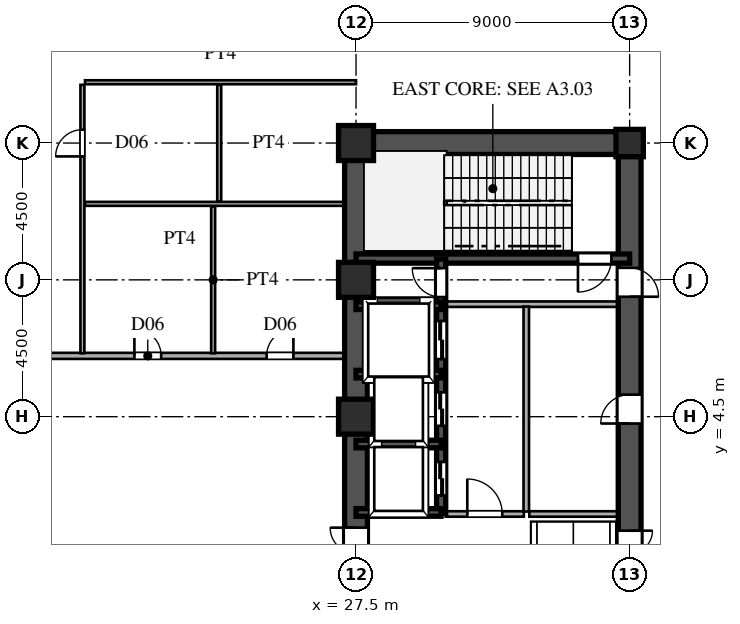
"""IFC4 building model, lengths in metres.
Left out: names, types, materials, properties, quantities, classifications, styles, units other than length and angle.
Written with IfcOpenShell. Run it as: python <this file> out.ifc"""

import sys

from ifc_helpers import new_model, si_unit, direction, frame, frame_2d, origin, origin_2d, place, context, subcontext, project, spatial, rectangle, hollow_rectangle, i_section, extrude, source, transform, mapped, element, fill, save


model = new_model("IFC4")
c1 = context("Model", 3, precision=1e-05, world=origin(), true_north=direction((0.0, 1.0)))
c2 = subcontext(c1, "Body", "Model", "MODEL_VIEW")
j1 = project(units=[si_unit("LENGTHUNIT", "METRE"), si_unit("PLANEANGLEUNIT", "RADIAN")], contexts=[c1])
p1 = place(None, origin())
s1 = spatial("IfcSite", under=j1, at=p1, CompositionType="ELEMENT")
p2 = place(p1, origin())
s2 = spatial("IfcBuilding", under=s1, at=p2, CompositionType="ELEMENT")
p3 = place(p2, origin())
s3 = spatial("IfcBuildingStorey", under=s2, at=p3, CompositionType="ELEMENT", Elevation=0.0)
m1 = source(origin(), c2, "Body", "SweptSolid", [
    extrude(hollow_rectangle(XDim=1.15, YDim=1.15, WallThickness=0.048, at=origin_2d()), origin(), (0.0, 0.0, 1.0), 5.4),
])
for number, where, z_axis, x_axis in (
    (1, (27.5, 4.5, 0.0), (0.0, 0.0, 1.0), (1.0, 0.0, 0.0)),
    (2, (27.5, 9.0, 0.0), (0.0, 0.0, 1.0), (1.0, 0.0, 0.0)),
    (3, (27.5, 13.5, 0.0), (0.0, 0.0, 1.0), (1.0, 0.0, 0.0)),
):
    element("IfcColumn", number, at=place(p3, frame(where, z_axis=z_axis, x_axis=x_axis)), inside=s3, PredefinedType="COLUMN", context=c2, shape_type="MappedRepresentation", body=[
        mapped(m1, transform((0.0, 0.0, 0.0), scale=1.0)),
    ])
m2 = source(origin(), c2, "Body", "SweptSolid", [
    extrude(i_section(OverallWidth=0.9, OverallDepth=0.9, WebThickness=0.036, FlangeThickness=0.055, at=origin_2d()), origin(), (0.0, 0.0, 1.0), 5.4),
])
p4 = place(p3, frame((36.5, 13.5, 0.0), z_axis=(0.0, 0.0, 1.0), x_axis=(1.0, 0.0, 0.0)))
e4 = element("IfcColumn", 4, at=p4, inside=s3, PredefinedType="COLUMN", context=c2, shape_type="MappedRepresentation", body=[
    mapped(m2, transform((0.0, 0.0, 0.0), scale=1.0)),
])
p5 = place(p3, frame((27.5, 1.3, 0.0), z_axis=(0.0, 0.0, 1.0), x_axis=(0.0, 1.0, 0.0)))
e5 = element("IfcWall", 5, at=p5, inside=s3, PredefinedType="SHEAR", context=c2, shape_type="SweptSolid", body=[
    extrude(rectangle(XDim=12.2, YDim=0.75, at=frame_2d((6.1, 0.0))), origin(), (0.0, 0.0, 1.0), 5.12),
])
p6 = place(p3, frame((27.5, -1.3, 0.0), z_axis=(0.0, 0.0, 1.0), x_axis=(0.0, 1.0, 0.0)))
e6 = element("IfcWall", 6, at=p6, inside=s3, PredefinedType="SHEAR", context=c2, shape_type="SweptSolid", body=[
    extrude(rectangle(XDim=2.6, YDim=0.75, at=frame_2d((1.3, 0.0))), origin(), (0.0, 0.0, 1.0), 5.12),
])
p7 = place(p6, frame((0.45, 0.0, 0.0)))
e7 = element("IfcOpeningElement", 7, at=p7, cuts=e6, PredefinedType="OPENING", context=c2, shape_type="SweptSolid", body=[
    extrude(rectangle(XDim=1.7, YDim=2.35, at=frame_2d((0.85, 1.175))), frame((0.0, 0.385, 0.0), z_axis=(0.0, -1.0, 0.0), x_axis=(1.0, 0.0, 0.0)), (0.0, 0.0, 1.0), 0.77),
])
p8 = place(p3, frame((27.5, 13.5, 0.0), z_axis=(0.0, 0.0, 1.0), x_axis=(1.0, 0.0, 0.0)))
e8 = element("IfcWall", 8, at=p8, inside=s3, PredefinedType="SHEAR", context=c2, shape_type="SweptSolid", body=[
    extrude(rectangle(XDim=9.0, YDim=0.75, at=frame_2d((4.5, 0.0))), origin(), (0.0, 0.0, 1.0), 5.12),
])
p9 = place(p3, frame((36.5, -1.3, 0.0), z_axis=(0.0, 0.0, 1.0), x_axis=(0.0, 1.0, 0.0)))
e9 = element("IfcWall", 9, at=p9, inside=s3, PredefinedType="SHEAR", context=c2, shape_type="SweptSolid", body=[
    extrude(rectangle(XDim=2.6, YDim=0.75, at=frame_2d((1.3, 0.0))), origin(), (0.0, 0.0, 1.0), 5.12),
])
p10 = place(p9, frame((0.55, 0.0, 0.0)))
e10 = element("IfcOpeningElement", 10, at=p10, cuts=e9, PredefinedType="OPENING", context=c2, shape_type="SweptSolid", body=[
    extrude(rectangle(XDim=1.5, YDim=2.3, at=frame_2d((0.75, 1.15))), frame((0.0, 0.385, 0.0), z_axis=(0.0, -1.0, 0.0), x_axis=(1.0, 0.0, 0.0)), (0.0, 0.0, 1.0), 0.77),
])
p11 = place(p3, frame((36.5, 8.2, 0.0), z_axis=(0.0, 0.0, 1.0), x_axis=(0.0, 1.0, 0.0)))
e11 = element("IfcWall", 11, at=p11, inside=s3, PredefinedType="SHEAR", context=c2, shape_type="SweptSolid", body=[
    extrude(rectangle(XDim=5.45, YDim=0.75, at=frame_2d((2.725, 0.0))), origin(), (0.0, 0.0, 1.0), 5.12),
])
p12 = place(p11, frame((0.245, 0.0, 0.0)))
e12 = element("IfcOpeningElement", 12, at=p12, cuts=e11, PredefinedType="OPENING", context=c2, shape_type="SweptSolid", body=[
    extrude(rectangle(XDim=0.95, YDim=2.15, at=frame_2d((0.475, 1.075))), frame((0.0, 0.385, 0.0), z_axis=(0.0, -1.0, 0.0), x_axis=(1.0, 0.0, 0.0)), (0.0, 0.0, 1.0), 0.77),
])
p13 = place(p3, frame((36.5, 1.3, 0.0), z_axis=(0.0, 0.0, 1.0), x_axis=(0.0, 1.0, 0.0)))
e13 = element("IfcWall", 13, at=p13, inside=s3, PredefinedType="SHEAR", context=c2, shape_type="SweptSolid", body=[
    extrude(rectangle(XDim=6.9, YDim=0.75, at=frame_2d((3.45, 0.0))), origin(), (0.0, 0.0, 1.0), 5.12),
])
p14 = place(p13, frame((2.975, 0.0, 0.0)))
e14 = element("IfcOpeningElement", 14, at=p14, cuts=e13, PredefinedType="OPENING", context=c2, shape_type="SweptSolid", body=[
    extrude(rectangle(XDim=0.95, YDim=2.15, at=frame_2d((0.475, 1.075))), frame((0.0, 0.385, 0.0), z_axis=(0.0, -1.0, 0.0), x_axis=(1.0, 0.0, 0.0)), (0.0, 0.0, 1.0), 0.77),
])
p15 = place(p3, frame((27.5, 9.7, 0.0), z_axis=(0.0, 0.0, 1.0), x_axis=(1.0, 0.0, 0.0)))
e15 = element("IfcWall", 15, at=p15, inside=s3, PredefinedType="SHEAR", context=c2, shape_type="SweptSolid", body=[
    extrude(rectangle(XDim=9.0, YDim=0.3, at=frame_2d((4.5, 0.0))), origin(), (0.0, 0.0, 1.0), 5.12),
])
p16 = place(p15, frame((7.3, 0.0, 0.0)))
e16 = element("IfcOpeningElement", 16, at=p16, cuts=e15, PredefinedType="OPENING", context=c2, shape_type="SweptSolid", body=[
    extrude(rectangle(XDim=1.1, YDim=2.2, at=frame_2d((0.55, 1.1))), frame((0.0, 0.16, 0.0), z_axis=(0.0, -1.0, 0.0), x_axis=(1.0, 0.0, 0.0)), (0.0, 0.0, 1.0), 0.32),
])
for number, where, z_axis, x_axis in (
    (17, (27.5, 1.35, 0.0), (0.0, 0.0, 1.0), (1.0, 0.0, 0.0)),
    (18, (27.5, 3.6, 0.0), (0.0, 0.0, 1.0), (1.0, 0.0, 0.0)),
    (19, (27.5, 5.9, 0.0), (0.0, 0.0, 1.0), (1.0, 0.0, 0.0)),
    (20, (27.5, 8.15, 0.0), (0.0, 0.0, 1.0), (1.0, 0.0, 0.0)),
):
    element("IfcWall", number, at=place(p3, frame(where, z_axis=z_axis, x_axis=x_axis)), inside=s3, PredefinedType="SHEAR", context=c2, shape_type="SweptSolid", body=[
        extrude(rectangle(XDim=2.8, YDim=0.25, at=frame_2d((1.4, 0.0))), origin(), (0.0, 0.0, 1.0), 5.12),
    ])
p17 = place(p3, frame((30.3, 1.32, 0.0), z_axis=(0.0, 0.0, 1.0), x_axis=(0.0, 1.0, 0.0)))
e21 = element("IfcWall", 21, at=p17, inside=s3, PredefinedType="SHEAR", context=c2, shape_type="SweptSolid", body=[
    extrude(rectangle(XDim=2.28, YDim=0.3, at=frame_2d((1.14, 0.0))), origin(), (0.0, 0.0, 1.0), 5.12),
])
p18 = place(p17, frame((0.59, 0.0, 0.0)))
e22 = element("IfcOpeningElement", 22, at=p18, cuts=e21, PredefinedType="OPENING", context=c2, shape_type="SweptSolid", body=[
    extrude(rectangle(XDim=1.1, YDim=2.2, at=frame_2d((0.55, 1.1))), frame((0.0, 0.16, 0.0), z_axis=(0.0, -1.0, 0.0), x_axis=(1.0, 0.0, 0.0)), (0.0, 0.0, 1.0), 0.32),
])
p19 = place(p3, frame((30.3, 3.6, 0.0), z_axis=(0.0, 0.0, 1.0), x_axis=(0.0, 1.0, 0.0)))
e23 = element("IfcWall", 23, at=p19, inside=s3, PredefinedType="SHEAR", context=c2, shape_type="SweptSolid", body=[
    extrude(rectangle(XDim=2.3, YDim=0.3, at=frame_2d((1.15, 0.0))), origin(), (0.0, 0.0, 1.0), 5.12),
])
p20 = place(p19, frame((0.6, 0.0, 0.0)))
e24 = element("IfcOpeningElement", 24, at=p20, cuts=e23, PredefinedType="OPENING", context=c2, shape_type="SweptSolid", body=[
    extrude(rectangle(XDim=1.1, YDim=2.2, at=frame_2d((0.55, 1.1))), frame((0.0, 0.16, 0.0), z_axis=(0.0, -1.0, 0.0), x_axis=(1.0, 0.0, 0.0)), (0.0, 0.0, 1.0), 0.32),
])
p21 = place(p3, frame((30.3, 5.9, 0.0), z_axis=(0.0, 0.0, 1.0), x_axis=(0.0, 1.0, 0.0)))
e25 = element("IfcWall", 25, at=p21, inside=s3, PredefinedType="SHEAR", context=c2, shape_type="SweptSolid", body=[
    extrude(rectangle(XDim=2.25, YDim=0.3, at=frame_2d((1.125, 0.0))), origin(), (0.0, 0.0, 1.0), 5.12),
])
p22 = place(p21, frame((0.495, 0.0, 0.0)))
e26 = element("IfcOpeningElement", 26, at=p22, cuts=e25, PredefinedType="OPENING", context=c2, shape_type="SweptSolid", body=[
    extrude(rectangle(XDim=1.25, YDim=2.3, at=frame_2d((0.625, 1.15))), frame((0.0, 0.16, 0.0), z_axis=(0.0, -1.0, 0.0), x_axis=(1.0, 0.0, 0.0)), (0.0, 0.0, 1.0), 0.32),
])
p23 = place(p3, frame((30.3, 8.15, 0.0), z_axis=(0.0, 0.0, 1.0), x_axis=(0.0, 1.0, 0.0)))
e27 = element("IfcWall", 27, at=p23, inside=s3, PredefinedType="SHEAR", context=c2, shape_type="SweptSolid", body=[
    extrude(rectangle(XDim=1.53, YDim=0.3, at=frame_2d((0.765, 0.0))), origin(), (0.0, 0.0, 1.0), 5.12),
])
p24 = place(p23, frame((0.285, 0.0, 0.0)))
e28 = element("IfcOpeningElement", 28, at=p24, cuts=e27, PredefinedType="OPENING", context=c2, shape_type="SweptSolid", body=[
    extrude(rectangle(XDim=0.95, YDim=2.15, at=frame_2d((0.475, 1.075))), frame((0.0, 0.16, 0.0), z_axis=(0.0, -1.0, 0.0), x_axis=(1.0, 0.0, 0.0)), (0.0, 0.0, 1.0), 0.32),
])
p25 = place(p3, frame((30.45, 8.2, 0.0), z_axis=(0.0, 0.0, 1.0), x_axis=(1.0, 0.0, 0.0)))
e29 = element("IfcWall", 29, at=p25, inside=s3, PredefinedType="PARTITIONING", context=c2, shape_type="SweptSolid", body=[
    extrude(rectangle(XDim=5.7, YDim=0.18, at=frame_2d((2.85, 0.0))), origin(), (0.0, 0.0, 1.0), 5.12),
])
p26 = place(p3, frame((33.1, 1.38, 0.0), z_axis=(0.0, 0.0, 1.0), x_axis=(0.0, 1.0, 0.0)))
e30 = element("IfcWall", 30, at=p26, inside=s3, PredefinedType="PARTITIONING", context=c2, shape_type="SweptSolid", body=[
    extrude(rectangle(XDim=6.74, YDim=0.18, at=frame_2d((3.37, 0.0))), origin(), (0.0, 0.0, 1.0), 5.12),
])
p27 = place(p3, frame((30.45, 1.3, 0.0), z_axis=(0.0, 0.0, 1.0), x_axis=(1.0, 0.0, 0.0)))
e31 = element("IfcWall", 31, at=p27, inside=s3, PredefinedType="PARTITIONING", context=c2, shape_type="SweptSolid", body=[
    extrude(rectangle(XDim=2.57, YDim=0.18, at=frame_2d((1.285, 0.0))), origin(), (0.0, 0.0, 1.0), 5.12),
])
p28 = place(p27, frame((0.71, 0.0, 0.0)))
e32 = element("IfcOpeningElement", 32, at=p28, cuts=e31, PredefinedType="OPENING", context=c2, shape_type="SweptSolid", body=[
    extrude(rectangle(XDim=1.15, YDim=2.2, at=frame_2d((0.575, 1.1))), frame((0.0, 0.1, 0.0), z_axis=(0.0, -1.0, 0.0), x_axis=(1.0, 0.0, 0.0)), (0.0, 0.0, 1.0), 0.2),
])
p29 = place(p3, frame((33.2, 1.3, 0.0), z_axis=(0.0, 0.0, 1.0), x_axis=(1.0, 0.0, 0.0)))
e33 = element("IfcWall", 33, at=p29, inside=s3, PredefinedType="PARTITIONING", context=c2, shape_type="SweptSolid", body=[
    extrude(rectangle(XDim=2.95, YDim=0.18, at=frame_2d((1.475, 0.0))), origin(), (0.0, 0.0, 1.0), 5.12),
])
p30 = place(p3, frame((-27.12, 6.5, 0.0), z_axis=(0.0, 0.0, 1.0), x_axis=(1.0, 0.0, 0.0)))
e34 = element("IfcWall", 34, at=p30, inside=s3, PredefinedType="PARTITIONING", context=c2, shape_type="SweptSolid", body=[
    extrude(rectangle(XDim=54.24, YDim=0.2, at=frame_2d((27.12, 0.0))), origin(), (0.0, 0.0, 1.0), 5.12),
])
p31 = place(p30, frame((4.045, 0.0, 0.0)))
e35 = element("IfcOpeningElement", 35, at=p31, cuts=e34, PredefinedType="OPENING", context=c2, shape_type="SweptSolid", body=[
    extrude(rectangle(XDim=1.15, YDim=2.2, at=frame_2d((0.575, 1.1))), frame((0.0, 0.11, 0.0), z_axis=(0.0, -1.0, 0.0), x_axis=(1.0, 0.0, 0.0)), (0.0, 0.0, 1.0), 0.22),
])
p32 = place(p30, frame((17.395, 0.0, 0.0)))
e36 = element("IfcOpeningElement", 36, at=p32, cuts=e34, PredefinedType="OPENING", context=c2, shape_type="SweptSolid", body=[
    extrude(rectangle(XDim=0.95, YDim=2.15, at=frame_2d((0.475, 1.075))), frame((0.0, 0.11, 0.0), z_axis=(0.0, -1.0, 0.0), x_axis=(1.0, 0.0, 0.0)), (0.0, 0.0, 1.0), 0.22),
])
p33 = place(p30, frame((47.33, 0.0, 0.0)))
e37 = element("IfcOpeningElement", 37, at=p33, cuts=e34, PredefinedType="OPENING", context=c2, shape_type="SweptSolid", body=[
    extrude(rectangle(XDim=0.88, YDim=2.1, at=frame_2d((0.44, 1.05))), frame((0.0, 0.11, 0.0), z_axis=(0.0, -1.0, 0.0), x_axis=(1.0, 0.0, 0.0)), (0.0, 0.0, 1.0), 0.22),
])
p34 = place(p30, frame((51.68, 0.0, 0.0)))
e38 = element("IfcOpeningElement", 38, at=p34, cuts=e34, PredefinedType="OPENING", context=c2, shape_type="SweptSolid", body=[
    extrude(rectangle(XDim=0.88, YDim=2.1, at=frame_2d((0.44, 1.05))), frame((0.0, 0.11, 0.0), z_axis=(0.0, -1.0, 0.0), x_axis=(1.0, 0.0, 0.0)), (0.0, 0.0, 1.0), 0.22),
])
p35 = place(p3, frame((18.585, 11.5, 0.0), z_axis=(0.0, 0.0, 1.0), x_axis=(1.0, 0.0, 0.0)))
e39 = element("IfcWall", 39, at=p35, inside=s3, PredefinedType="PARTITIONING", context=c2, shape_type="SweptSolid", body=[
    extrude(rectangle(XDim=8.535, YDim=0.13, at=frame_2d((4.268, 0.0))), origin(), (0.0, 0.0, 1.0), 5.12),
])
p36 = place(p3, frame((18.585, 15.5, 0.0), z_axis=(0.0, 0.0, 1.0), x_axis=(1.0, 0.0, 0.0)))
e40 = element("IfcWall", 40, at=p36, inside=s3, PredefinedType="PARTITIONING", context=c2, shape_type="SweptSolid", body=[
    extrude(rectangle(XDim=8.915, YDim=0.13, at=frame_2d((4.458, 0.0))), origin(), (0.0, 0.0, 1.0), 5.12),
])
p37 = place(p3, frame((18.5, 6.585, 0.0), z_axis=(0.0, 0.0, 1.0), x_axis=(0.0, 1.0, 0.0)))
e41 = element("IfcWall", 41, at=p37, inside=s3, PredefinedType="PARTITIONING", context=c2, shape_type="SweptSolid", body=[
    extrude(rectangle(XDim=8.83, YDim=0.13, at=frame_2d((4.415, 0.0))), origin(), (0.0, 0.0, 1.0), 5.12),
])
p38 = place(p37, frame((6.475, 0.0, 0.0)))
e42 = element("IfcOpeningElement", 42, at=p38, cuts=e41, PredefinedType="OPENING", context=c2, shape_type="SweptSolid", body=[
    extrude(rectangle(XDim=0.88, YDim=2.1, at=frame_2d((0.44, 1.05))), frame((0.0, 0.075, 0.0), z_axis=(0.0, -1.0, 0.0), x_axis=(1.0, 0.0, 0.0)), (0.0, 0.0, 1.0), 0.15),
])
p39 = place(p3, frame((22.8, 6.585, 0.0), z_axis=(0.0, 0.0, 1.0), x_axis=(0.0, 1.0, 0.0)))
e43 = element("IfcWall", 43, at=p39, inside=s3, PredefinedType="PARTITIONING", context=c2, shape_type="SweptSolid", body=[
    extrude(rectangle(XDim=4.83, YDim=0.13, at=frame_2d((2.415, 0.0))), origin(), (0.0, 0.0, 1.0), 5.12),
])
p40 = place(p3, frame((23.0, 11.585, 0.0), z_axis=(0.0, 0.0, 1.0), x_axis=(0.0, 1.0, 0.0)))
e44 = element("IfcWall", 44, at=p40, inside=s3, PredefinedType="PARTITIONING", context=c2, shape_type="SweptSolid", body=[
    extrude(rectangle(XDim=3.83, YDim=0.13, at=frame_2d((1.915, 0.0))), origin(), (0.0, 0.0, 1.0), 5.12),
])
m3 = source(origin(), c2, "Body", "SweptSolid", [
    extrude(rectangle(XDim=1.7, YDim=2.35, at=frame_2d((0.85, 1.175))), frame((0.0, 0.025, 0.0), z_axis=(0.0, -1.0, 0.0), x_axis=(1.0, 0.0, 0.0)), (0.0, 0.0, 1.0), 0.05),
])
p41 = place(p7, origin())
e45 = element("IfcDoor", 45, at=p41, inside=s3, OperationType="DOUBLE_SWING_LEFT", PredefinedType="DOOR", context=c2, shape_type="MappedRepresentation", body=[
    mapped(m3, transform((0.0, 0.0, 0.0), scale=1.0)),
])
fill(e7, e45)
m4 = source(origin(), c2, "Body", "SweptSolid", [
    extrude(rectangle(XDim=1.5, YDim=2.3, at=frame_2d((0.75, 1.15))), frame((0.0, 0.025, 0.0), z_axis=(0.0, -1.0, 0.0), x_axis=(1.0, 0.0, 0.0)), (0.0, 0.0, 1.0), 0.05),
])
p42 = place(p10, frame((1.5, 0.0, 0.0), z_axis=(0.0, 0.0, 1.0), x_axis=(-1.0, 0.0, 0.0)))
e46 = element("IfcDoor", 46, at=p42, inside=s3, OperationType="DOUBLE_SWING_LEFT", PredefinedType="DOOR", context=c2, shape_type="MappedRepresentation", body=[
    mapped(m4, transform((0.0, 0.0, 0.0), scale=1.0)),
])
fill(e10, e46)
m5 = source(origin(), c2, "Body", "SweptSolid", [
    extrude(rectangle(XDim=0.95, YDim=2.15, at=frame_2d((0.475, 1.075))), frame((0.0, 0.025, 0.0), z_axis=(0.0, -1.0, 0.0), x_axis=(1.0, 0.0, 0.0)), (0.0, 0.0, 1.0), 0.05),
])
p43 = place(p12, frame((0.95, 0.0, 0.0), z_axis=(0.0, 0.0, 1.0), x_axis=(-1.0, 0.0, 0.0)))
e47 = element("IfcDoor", 47, at=p43, inside=s3, OperationType="SINGLE_SWING_LEFT", PredefinedType="DOOR", context=c2, shape_type="MappedRepresentation", body=[
    mapped(m5, transform((0.0, 0.0, 0.0), scale=1.0)),
])
fill(e12, e47)
p44 = place(p14, origin())
e48 = element("IfcDoor", 48, at=p44, inside=s3, OperationType="SINGLE_SWING_LEFT", PredefinedType="DOOR", context=c2, shape_type="MappedRepresentation", body=[
    mapped(m5, transform((0.0, 0.0, 0.0), scale=1.0)),
])
fill(e14, e48)
m6 = source(origin(), c2, "Body", "SweptSolid", [
    extrude(rectangle(XDim=1.1, YDim=2.2, at=frame_2d((0.55, 1.1))), frame((0.0, 0.025, 0.0), z_axis=(0.0, -1.0, 0.0), x_axis=(1.0, 0.0, 0.0)), (0.0, 0.0, 1.0), 0.05),
])
p45 = place(p16, frame((1.1, 0.0, 0.0), z_axis=(0.0, 0.0, 1.0), x_axis=(-1.0, 0.0, 0.0)))
e49 = element("IfcDoor", 49, at=p45, inside=s3, OperationType="SINGLE_SWING_LEFT", PredefinedType="DOOR", context=c2, shape_type="MappedRepresentation", body=[
    mapped(m6, transform((0.0, 0.0, 0.0), scale=1.0)),
])
fill(e16, e49)
m7 = source(origin(), c2, "Body", "SweptSolid", [
    extrude(rectangle(XDim=1.1, YDim=2.2, at=frame_2d((0.55, 1.1))), frame((0.0, 0.025, 0.0), z_axis=(0.0, -1.0, 0.0), x_axis=(1.0, 0.0, 0.0)), (0.0, 0.0, 1.0), 0.05),
])
p46 = place(p18, origin())
e50 = element("IfcDoor", 50, at=p46, inside=s3, OperationType="DOUBLE_DOOR_SLIDING", PredefinedType="DOOR", context=c2, shape_type="MappedRepresentation", body=[
    mapped(m7, transform((0.0, 0.0, 0.0), scale=1.0)),
])
fill(e22, e50)
p47 = place(p20, origin())
e51 = element("IfcDoor", 51, at=p47, inside=s3, OperationType="DOUBLE_DOOR_SLIDING", PredefinedType="DOOR", context=c2, shape_type="MappedRepresentation", body=[
    mapped(m7, transform((0.0, 0.0, 0.0), scale=1.0)),
])
fill(e24, e51)
m8 = source(origin(), c2, "Body", "SweptSolid", [
    extrude(rectangle(XDim=1.25, YDim=2.3, at=frame_2d((0.625, 1.15))), frame((0.0, 0.025, 0.0), z_axis=(0.0, -1.0, 0.0), x_axis=(1.0, 0.0, 0.0)), (0.0, 0.0, 1.0), 0.05),
])
p48 = place(p22, origin())
e52 = element("IfcDoor", 52, at=p48, inside=s3, OperationType="DOUBLE_DOOR_SLIDING", PredefinedType="DOOR", context=c2, shape_type="MappedRepresentation", body=[
    mapped(m8, transform((0.0, 0.0, 0.0), scale=1.0)),
])
fill(e26, e52)
p49 = place(p24, origin())
e53 = element("IfcDoor", 53, at=p49, inside=s3, OperationType="SINGLE_SWING_RIGHT", PredefinedType="DOOR", context=c2, shape_type="MappedRepresentation", body=[
    mapped(m5, transform((0.0, 0.0, 0.0), scale=1.0)),
])
fill(e28, e53)
m9 = source(origin(), c2, "Body", "SweptSolid", [
    extrude(rectangle(XDim=1.15, YDim=2.2, at=frame_2d((0.575, 1.1))), frame((0.0, 0.025, 0.0), z_axis=(0.0, -1.0, 0.0), x_axis=(1.0, 0.0, 0.0)), (0.0, 0.0, 1.0), 0.05),
])
p50 = place(p28, origin())
e54 = element("IfcDoor", 54, at=p50, inside=s3, OperationType="SINGLE_SWING_LEFT", PredefinedType="DOOR", context=c2, shape_type="MappedRepresentation", body=[
    mapped(m9, transform((0.0, 0.0, 0.0), scale=1.0)),
])
fill(e32, e54)
m10 = source(origin(), c2, "Body", "SweptSolid", [
    extrude(rectangle(XDim=0.88, YDim=2.1, at=frame_2d((0.44, 1.05))), frame((0.0, 0.025, 0.0), z_axis=(0.0, -1.0, 0.0), x_axis=(1.0, 0.0, 0.0)), (0.0, 0.0, 1.0), 0.05),
])
p51 = place(p33, origin())
e55 = element("IfcDoor", 55, at=p51, inside=s3, OperationType="SINGLE_SWING_LEFT", PredefinedType="DOOR", context=c2, shape_type="MappedRepresentation", body=[
    mapped(m10, transform((0.0, 0.0, 0.0), scale=1.0)),
])
fill(e37, e55)
p52 = place(p34, origin())
e56 = element("IfcDoor", 56, at=p52, inside=s3, OperationType="SINGLE_SWING_RIGHT", PredefinedType="DOOR", context=c2, shape_type="MappedRepresentation", body=[
    mapped(m10, transform((0.0, 0.0, 0.0), scale=1.0)),
])
fill(e38, e56)
p53 = place(p38, origin())
e57 = element("IfcDoor", 57, at=p53, inside=s3, OperationType="SINGLE_SWING_LEFT", PredefinedType="DOOR", context=c2, shape_type="MappedRepresentation", body=[
    mapped(m10, transform((0.0, 0.0, 0.0), scale=1.0)),
])
fill(e42, e57)
save(model, sys.argv[1])
